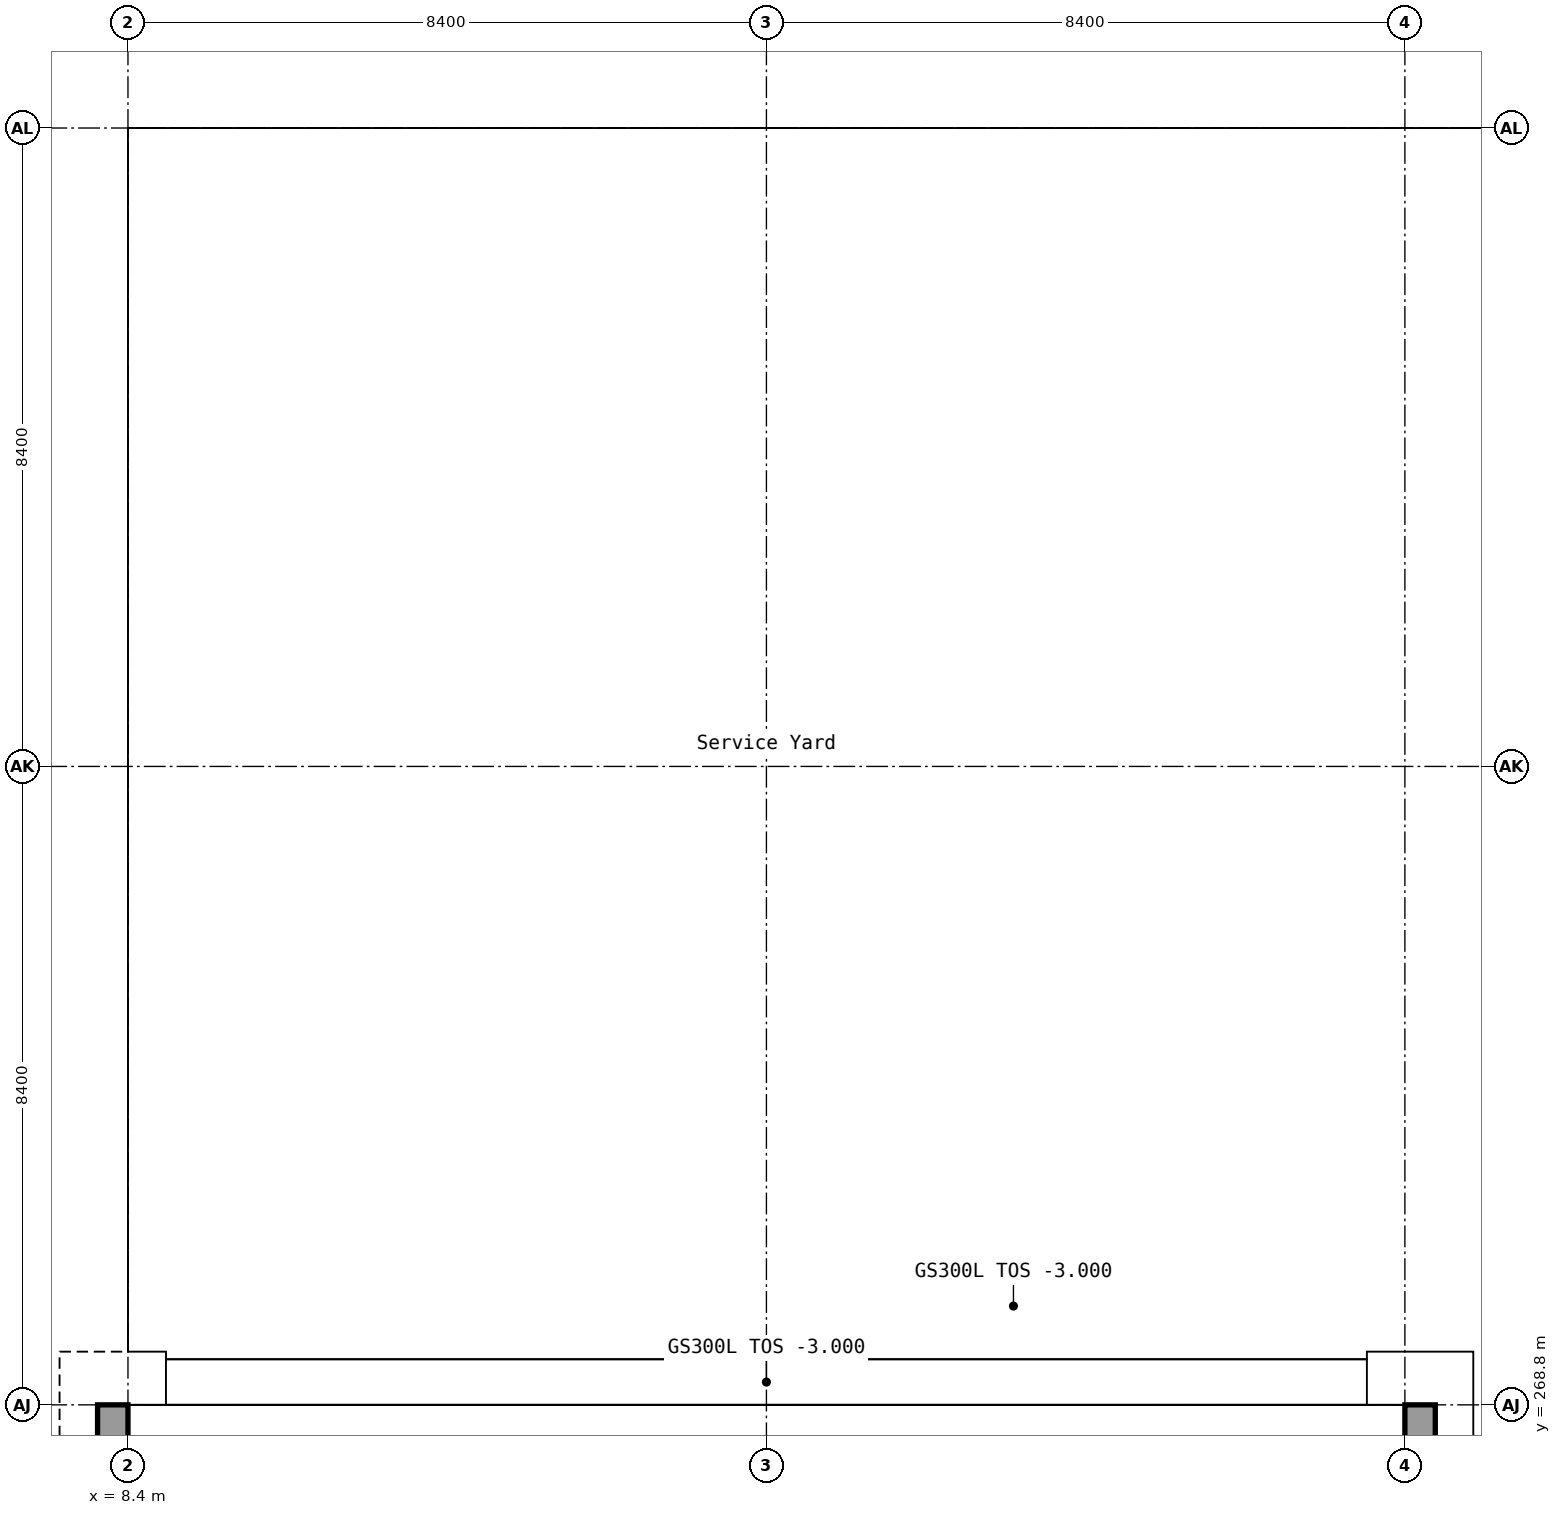
"""IFC4 building model, lengths in metres.
Left out: names, types, materials, properties, quantities, classifications, styles, units other than length and angle.
Written with IfcOpenShell. Run it as: python <this file> out.ifc"""

import sys

from ifc_helpers import new_model, si_unit, direction, frame, origin, place, context, subcontext, project, spatial, polyline, outline, extrude, element, save


model = new_model("IFC4")
c1 = context("Model", 3, precision=1e-05, world=origin(), true_north=direction((0.0, 1.0)))
c2 = subcontext(c1, "Body", "Model", "MODEL_VIEW")
j1 = project(units=[si_unit("LENGTHUNIT", "METRE"), si_unit("PLANEANGLEUNIT", "RADIAN")], contexts=[c1])
p1 = place(None, origin())
s1 = spatial("IfcSite", under=j1, at=p1, CompositionType="ELEMENT")
p2 = place(p1, origin())
s2 = spatial("IfcBuilding", under=s1, at=p2, CompositionType="ELEMENT")
p3 = place(p2, frame((0.0, 0.0, -3.0)))
s3 = spatial("IfcBuildingStorey", under=s2, at=p3, CompositionType="ELEMENT", Elevation=-3.0)
for number, where, z_axis, x_axis in (
    (1, (8.2, 268.8, 0.0), (0.0, 0.0, 1.0), (0.0, -1.0, 0.0)),
    (2, (25.4, 268.8, 0.0), (0.0, 0.0, 1.0), (0.0, -1.0, 0.0)),
):
    element("IfcWall", number, at=place(p3, frame(where, z_axis=z_axis, x_axis=x_axis)), inside=s3, PredefinedType="SOLIDWALL", context=c2, shape_type="SweptSolid", body=[
        extrude(outline(polyline([(0.0, 0.0), (33.6, 0.0), (33.6, 4.1), (0.0, 1.1), (0.0, 0.0)])), frame((0.0, 0.2, 0.0), z_axis=(0.0, -1.0, 0.0), x_axis=(1.0, 0.0, 0.0)), (0.0, 0.0, 1.0), 0.4),
    ])
save(model, sys.argv[1])
